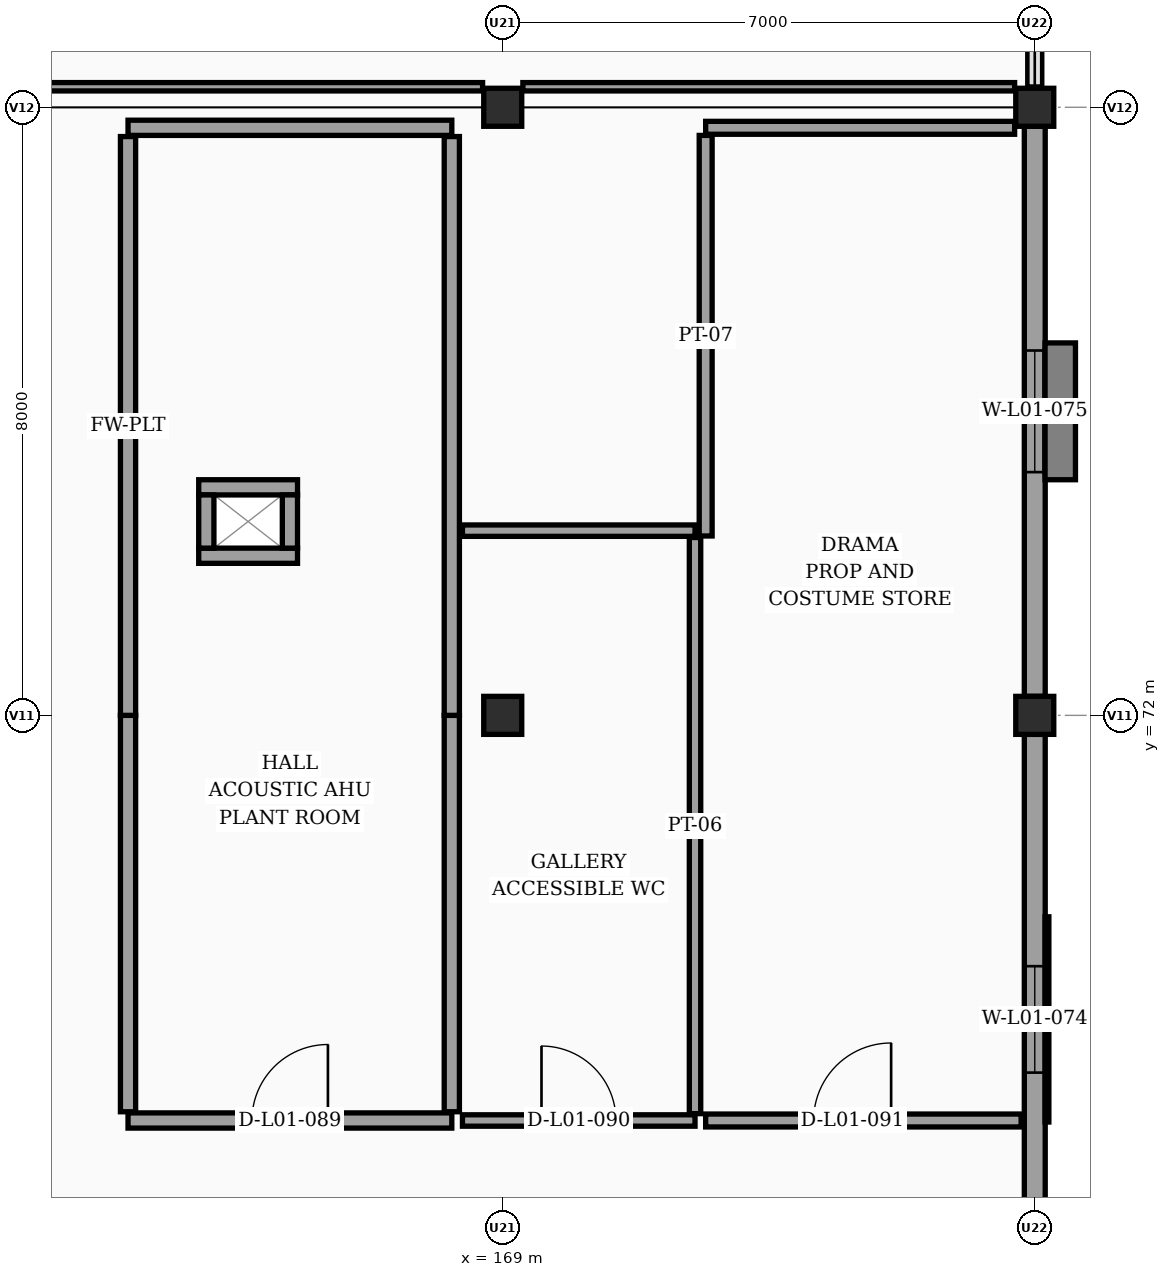
"""IFC4 building model, lengths in metres.
Left out: names, types, materials, properties, quantities, classifications, styles, units other than length and angle.
Written with IfcOpenShell. Run it as: python <this file> out.ifc"""

import sys

from ifc_helpers import new_model, si_unit, direction, frame, frame_2d, origin, origin_2d, place, context, subcontext, project, spatial, rectangle, extrude, element, fill, save


model = new_model("IFC4")
c1 = context("Model", 3, precision=1e-05, world=origin(), true_north=direction((0.0, 1.0)))
c2 = subcontext(c1, "Body", "Model", "MODEL_VIEW")
j1 = project(units=[si_unit("LENGTHUNIT", "METRE"), si_unit("PLANEANGLEUNIT", "RADIAN")], contexts=[c1])
p1 = place(None, origin())
s1 = spatial("IfcSite", under=j1, at=p1, CompositionType="ELEMENT")
p2 = place(p1, origin())
s2 = spatial("IfcBuilding", under=s1, at=p2, CompositionType="ELEMENT")
p3 = place(p2, frame((0.0, 0.0, 4.5)))
s3 = spatial("IfcBuildingStorey", under=s2, at=p3, CompositionType="ELEMENT", Elevation=4.5)
p4 = place(p3, frame((169.0, 72.0, 0.0), z_axis=(0.0, 0.0, 1.0), x_axis=(1.0, 0.0, 0.0)))
e1 = element("IfcColumn", 1, at=p4, inside=s3, PredefinedType="COLUMN", context=c2, shape_type="SweptSolid", body=[
    extrude(rectangle(XDim=0.5, YDim=0.5, at=origin_2d()), origin(), (0.0, 0.0, 1.0), 5.241),
])
p5 = place(p3, frame((169.0, 80.0, 0.0), z_axis=(0.0, 0.0, 1.0), x_axis=(1.0, 0.0, 0.0)))
e2 = element("IfcColumn", 2, at=p5, inside=s3, PredefinedType="COLUMN", context=c2, shape_type="SweptSolid", body=[
    extrude(rectangle(XDim=0.5, YDim=0.5, at=origin_2d()), origin(), (0.0, 0.0, 1.0), 5.827),
])
p6 = place(p3, frame((176.0, 72.0, 0.0), z_axis=(0.0, 0.0, 1.0), x_axis=(1.0, 0.0, 0.0)))
e3 = element("IfcColumn", 3, at=p6, inside=s3, PredefinedType="COLUMN", context=c2, shape_type="SweptSolid", body=[
    extrude(rectangle(XDim=0.5, YDim=0.5, at=origin_2d()), origin(), (0.0, 0.0, 1.0), 5.175),
])
p7 = place(p3, frame((176.0, 80.0, 0.0), z_axis=(0.0, 0.0, 1.0), x_axis=(1.0, 0.0, 0.0)))
e4 = element("IfcColumn", 4, at=p7, inside=s3, PredefinedType="COLUMN", context=c2, shape_type="SweptSolid", body=[
    extrude(rectangle(XDim=0.5, YDim=0.5, at=origin_2d()), origin(), (0.0, 0.0, 1.0), 5.761),
])
p8 = place(p3, frame((176.0, 71.75, 0.0), z_axis=(0.0, 0.0, 1.0), x_axis=(0.0, -1.0, 0.0)))
e5 = element("IfcWall", 5, at=p8, inside=s3, PredefinedType="SOLIDWALL", context=c2, shape_type="SweptSolid", body=[
    extrude(rectangle(XDim=7.5, YDim=0.275, at=frame_2d((3.75, 0.0))), origin(), (0.0, 0.0, 1.0), 3.878),
])
p9 = place(p8, frame((3.05, 0.0, 0.95)))
e6 = element("IfcOpeningElement", 6, at=p9, cuts=e5, PredefinedType="OPENING", context=c2, shape_type="SweptSolid", body=[
    extrude(rectangle(XDim=1.4, YDim=1.65, at=frame_2d((0.7, 0.825))), frame((0.0, 0.147, 0.0), z_axis=(0.0, -1.0, 0.0), x_axis=(1.0, 0.0, 0.0)), (0.0, 0.0, 1.0), 0.295),
])
p10 = place(p3, frame((176.0, 79.75, 0.0), z_axis=(0.0, 0.0, 1.0), x_axis=(0.0, -1.0, 0.0)))
e7 = element("IfcWall", 7, at=p10, inside=s3, PredefinedType="SOLIDWALL", context=c2, shape_type="SweptSolid", body=[
    extrude(rectangle(XDim=7.5, YDim=0.275, at=frame_2d((3.75, 0.0))), origin(), (0.0, 0.0, 1.0), 4.464),
])
p11 = place(p10, frame((2.95, 0.0, 0.95)))
e8 = element("IfcOpeningElement", 8, at=p11, cuts=e7, PredefinedType="OPENING", context=c2, shape_type="SweptSolid", body=[
    extrude(rectangle(XDim=1.6, YDim=1.65, at=frame_2d((0.8, 0.825))), frame((0.0, 0.147, 0.0), z_axis=(0.0, -1.0, 0.0), x_axis=(1.0, 0.0, 0.0)), (0.0, 0.0, 1.0), 0.295),
])
p12 = place(p3, frame((176.0, 87.75, 0.0), z_axis=(0.0, 0.0, 1.0), x_axis=(0.0, -1.0, 0.0)))
e9 = element("IfcWall", 9, at=p12, inside=s3, PredefinedType="SOLIDWALL", context=c2, shape_type="SweptSolid", body=[
    extrude(rectangle(XDim=7.5, YDim=0.185, at=frame_2d((3.75, 0.0))), origin(), (0.0, 0.0, 1.0), 0.95),
])
for number, where, z_axis, x_axis in (
    (10, (166.3, 74.1, 0.0), (0.0, 0.0, 1.0), (-1.0, 0.0, 0.0)),
    (11, (165.0, 75.0, 0.0), (0.0, 0.0, 1.0), (1.0, 0.0, 0.0)),
):
    element("IfcWall", number, at=place(p3, frame(where, z_axis=z_axis, x_axis=x_axis)), inside=s3, PredefinedType="PARTITIONING", context=c2, shape_type="SweptSolid", body=[
        extrude(rectangle(XDim=1.3, YDim=0.2, at=frame_2d((0.65, 0.0))), origin(), (0.0, 0.0, 1.0), 3.65),
    ])
for number, where, z_axis, x_axis in (
    (12, (165.1, 74.2, 0.0), (0.0, 0.0, 1.0), (0.0, 1.0, 0.0)),
    (13, (166.2, 74.9, 0.0), (0.0, 0.0, 1.0), (0.0, -1.0, 0.0)),
):
    element("IfcWall", number, at=place(p3, frame(where, z_axis=z_axis, x_axis=x_axis)), inside=s3, PredefinedType="PARTITIONING", context=c2, shape_type="SweptSolid", body=[
        extrude(rectangle(XDim=0.7, YDim=0.2, at=frame_2d((0.35, 0.0))), origin(), (0.0, 0.0, 1.0), 3.65),
    ])
p13 = place(p3, frame((164.07, 66.67, 0.0), z_axis=(0.0, 0.0, 1.0), x_axis=(1.0, 0.0, 0.0)))
e14 = element("IfcWall", 14, at=p13, inside=s3, PredefinedType="PARTITIONING", context=c2, shape_type="SweptSolid", body=[
    extrude(rectangle(XDim=4.26, YDim=0.2, at=frame_2d((2.13, 0.0))), origin(), (0.0, 0.0, 1.0), 3.65),
])
p14 = place(p13, frame((1.63, 0.0, 0.0)))
e15 = element("IfcOpeningElement", 15, at=p14, cuts=e14, PredefinedType="OPENING", context=c2, shape_type="SweptSolid", body=[
    extrude(rectangle(XDim=1.0, YDim=2.15, at=frame_2d((0.5, 1.075))), frame((0.0, 0.11, 0.0), z_axis=(0.0, -1.0, 0.0), x_axis=(1.0, 0.0, 0.0)), (0.0, 0.0, 1.0), 0.22),
])
p15 = place(p3, frame((164.07, 79.73, 0.0), z_axis=(0.0, 0.0, 1.0), x_axis=(1.0, 0.0, 0.0)))
e16 = element("IfcWall", 16, at=p15, inside=s3, PredefinedType="PARTITIONING", context=c2, shape_type="SweptSolid", body=[
    extrude(rectangle(XDim=4.26, YDim=0.2, at=frame_2d((2.13, 0.0))), origin(), (0.0, 0.0, 1.0), 3.65),
])
p16 = place(p3, frame((164.07, 66.785, 0.0), z_axis=(0.0, 0.0, 1.0), x_axis=(0.0, 1.0, 0.0)))
e17 = element("IfcWall", 17, at=p16, inside=s3, PredefinedType="PARTITIONING", context=c2, shape_type="SweptSolid", body=[
    extrude(rectangle(XDim=5.215, YDim=0.2, at=frame_2d((2.607, 0.0))), origin(), (0.0, 0.0, 1.0), 3.65),
])
p17 = place(p3, frame((164.07, 72.0, 0.0), z_axis=(0.0, 0.0, 1.0), x_axis=(0.0, 1.0, 0.0)))
e18 = element("IfcWall", 18, at=p17, inside=s3, PredefinedType="PARTITIONING", context=c2, shape_type="SweptSolid", body=[
    extrude(rectangle(XDim=7.615, YDim=0.2, at=frame_2d((3.808, 0.0))), origin(), (0.0, 0.0, 1.0), 3.65),
])
p18 = place(p3, frame((168.33, 66.785, 0.0), z_axis=(0.0, 0.0, 1.0), x_axis=(0.0, 1.0, 0.0)))
e19 = element("IfcWall", 19, at=p18, inside=s3, PredefinedType="PARTITIONING", context=c2, shape_type="SweptSolid", body=[
    extrude(rectangle(XDim=5.215, YDim=0.2, at=frame_2d((2.607, 0.0))), origin(), (0.0, 0.0, 1.0), 3.65),
])
p19 = place(p3, frame((168.33, 72.0, 0.0), z_axis=(0.0, 0.0, 1.0), x_axis=(0.0, 1.0, 0.0)))
e20 = element("IfcWall", 20, at=p19, inside=s3, PredefinedType="PARTITIONING", context=c2, shape_type="SweptSolid", body=[
    extrude(rectangle(XDim=7.615, YDim=0.2, at=frame_2d((3.808, 0.0))), origin(), (0.0, 0.0, 1.0), 3.65),
])
p20 = place(p3, frame((168.47, 66.67, 0.0), z_axis=(0.0, 0.0, 1.0), x_axis=(1.0, 0.0, 0.0)))
e21 = element("IfcWall", 21, at=p20, inside=s3, PredefinedType="PARTITIONING", context=c2, shape_type="SweptSolid", body=[
    extrude(rectangle(XDim=3.06, YDim=0.15, at=frame_2d((1.53, 0.0))), origin(), (0.0, 0.0, 1.0), 3.65),
])
p21 = place(p20, frame((1.04, 0.0, 0.0)))
e22 = element("IfcOpeningElement", 22, at=p21, cuts=e21, PredefinedType="OPENING", context=c2, shape_type="SweptSolid", body=[
    extrude(rectangle(XDim=0.98, YDim=2.1, at=frame_2d((0.49, 1.05))), frame((0.0, 0.085, 0.0), z_axis=(0.0, -1.0, 0.0), x_axis=(1.0, 0.0, 0.0)), (0.0, 0.0, 1.0), 0.17),
])
p22 = place(p3, frame((168.47, 74.43, 0.0), z_axis=(0.0, 0.0, 1.0), x_axis=(1.0, 0.0, 0.0)))
e23 = element("IfcWall", 23, at=p22, inside=s3, PredefinedType="PARTITIONING", context=c2, shape_type="SweptSolid", body=[
    extrude(rectangle(XDim=3.06, YDim=0.15, at=frame_2d((1.53, 0.0))), origin(), (0.0, 0.0, 1.0), 3.65),
])
p23 = place(p3, frame((171.53, 66.76, 0.0), z_axis=(0.0, 0.0, 1.0), x_axis=(0.0, 1.0, 0.0)))
e24 = element("IfcWall", 24, at=p23, inside=s3, PredefinedType="PARTITIONING", context=c2, shape_type="SweptSolid", body=[
    extrude(rectangle(XDim=7.58, YDim=0.15, at=frame_2d((3.79, 0.0))), origin(), (0.0, 0.0, 1.0), 3.65),
])
p24 = place(p3, frame((171.67, 66.67, 0.0), z_axis=(0.0, 0.0, 1.0), x_axis=(1.0, 0.0, 0.0)))
e25 = element("IfcWall", 25, at=p24, inside=s3, PredefinedType="PARTITIONING", context=c2, shape_type="SweptSolid", body=[
    extrude(rectangle(XDim=4.151, YDim=0.17, at=frame_2d((2.075, 0.0))), origin(), (0.0, 0.0, 1.0), 3.65),
])
p25 = place(p24, frame((1.42, 0.0, 0.0)))
e26 = element("IfcOpeningElement", 26, at=p25, cuts=e25, PredefinedType="OPENING", context=c2, shape_type="SweptSolid", body=[
    extrude(rectangle(XDim=1.02, YDim=2.1, at=frame_2d((0.51, 1.05))), frame((0.0, 0.095, 0.0), z_axis=(0.0, -1.0, 0.0), x_axis=(1.0, 0.0, 0.0)), (0.0, 0.0, 1.0), 0.19),
])
p26 = place(p3, frame((171.67, 79.73, 0.0), z_axis=(0.0, 0.0, 1.0), x_axis=(1.0, 0.0, 0.0)))
e27 = element("IfcWall", 27, at=p26, inside=s3, PredefinedType="PARTITIONING", context=c2, shape_type="SweptSolid", body=[
    extrude(rectangle(XDim=4.065, YDim=0.17, at=frame_2d((2.033, 0.0))), origin(), (0.0, 0.0, 1.0), 3.65),
])
p27 = place(p3, frame((171.67, 74.36, 0.0), z_axis=(0.0, 0.0, 1.0), x_axis=(0.0, 1.0, 0.0)))
e28 = element("IfcWall", 28, at=p27, inside=s3, PredefinedType="PARTITIONING", context=c2, shape_type="SweptSolid", body=[
    extrude(rectangle(XDim=5.27, YDim=0.17, at=frame_2d((2.635, 0.0))), origin(), (0.0, 0.0, 1.0), 3.65),
])
for number, where, z_axis, x_axis in (
    (29, (162.265, 80.27, 0.0), (0.0, 0.0, 1.0), (1.0, 0.0, 0.0)),
    (30, (169.265, 80.27, 0.0), (0.0, 0.0, 1.0), (1.0, 0.0, 0.0)),
):
    element("IfcWall", number, at=place(p3, frame(where, z_axis=z_axis, x_axis=x_axis)), inside=s3, PredefinedType="PARTITIONING", context=c2, shape_type="SweptSolid", body=[
        extrude(rectangle(XDim=6.47, YDim=0.11, at=frame_2d((3.235, 0.0))), origin(), (0.0, 0.0, 1.0), 3.65),
    ])
p28 = place(p9, origin())
e31 = element("IfcWindow", 31, at=p28, inside=s3, PartitioningType="SINGLE_PANEL", PredefinedType="WINDOW", context=c2, shape_type="SweptSolid", body=[
    extrude(rectangle(XDim=1.4, YDim=1.65, at=frame_2d((0.7, 0.825))), frame((0.0, 0.03, 0.0), z_axis=(0.0, -1.0, 0.0), x_axis=(1.0, 0.0, 0.0)), (0.0, 0.0, 1.0), 0.06),
])
fill(e6, e31)
p29 = place(p11, origin())
e32 = element("IfcWindow", 32, at=p29, inside=s3, PartitioningType="DOUBLE_PANEL_VERTICAL", PredefinedType="WINDOW", context=c2, shape_type="SweptSolid", body=[
    extrude(rectangle(XDim=1.6, YDim=1.65, at=frame_2d((0.8, 0.825))), frame((0.0, 0.03, 0.0), z_axis=(0.0, -1.0, 0.0), x_axis=(1.0, 0.0, 0.0)), (0.0, 0.0, 1.0), 0.06),
])
fill(e8, e32)
p30 = place(p14, origin())
e33 = element("IfcDoor", 33, at=p30, inside=s3, OperationType="SINGLE_SWING_RIGHT", PredefinedType="DOOR", context=c2, shape_type="SweptSolid", body=[
    extrude(rectangle(XDim=1.0, YDim=2.15, at=frame_2d((0.5, 1.075))), frame((0.0, 0.025, 0.0), z_axis=(0.0, -1.0, 0.0), x_axis=(1.0, 0.0, 0.0)), (0.0, 0.0, 1.0), 0.05),
])
fill(e15, e33)
p31 = place(p21, origin())
e34 = element("IfcDoor", 34, at=p31, inside=s3, OperationType="SINGLE_SWING_LEFT", PredefinedType="DOOR", context=c2, shape_type="SweptSolid", body=[
    extrude(rectangle(XDim=0.98, YDim=2.1, at=frame_2d((0.49, 1.05))), frame((0.0, 0.025, 0.0), z_axis=(0.0, -1.0, 0.0), x_axis=(1.0, 0.0, 0.0)), (0.0, 0.0, 1.0), 0.05),
])
fill(e22, e34)
p32 = place(p25, origin())
e35 = element("IfcDoor", 35, at=p32, inside=s3, OperationType="SINGLE_SWING_RIGHT", PredefinedType="DOOR", context=c2, shape_type="SweptSolid", body=[
    extrude(rectangle(XDim=1.02, YDim=2.1, at=frame_2d((0.51, 1.05))), frame((0.0, 0.025, 0.0), z_axis=(0.0, -1.0, 0.0), x_axis=(1.0, 0.0, 0.0)), (0.0, 0.0, 1.0), 0.05),
])
fill(e26, e35)
save(model, sys.argv[1])
